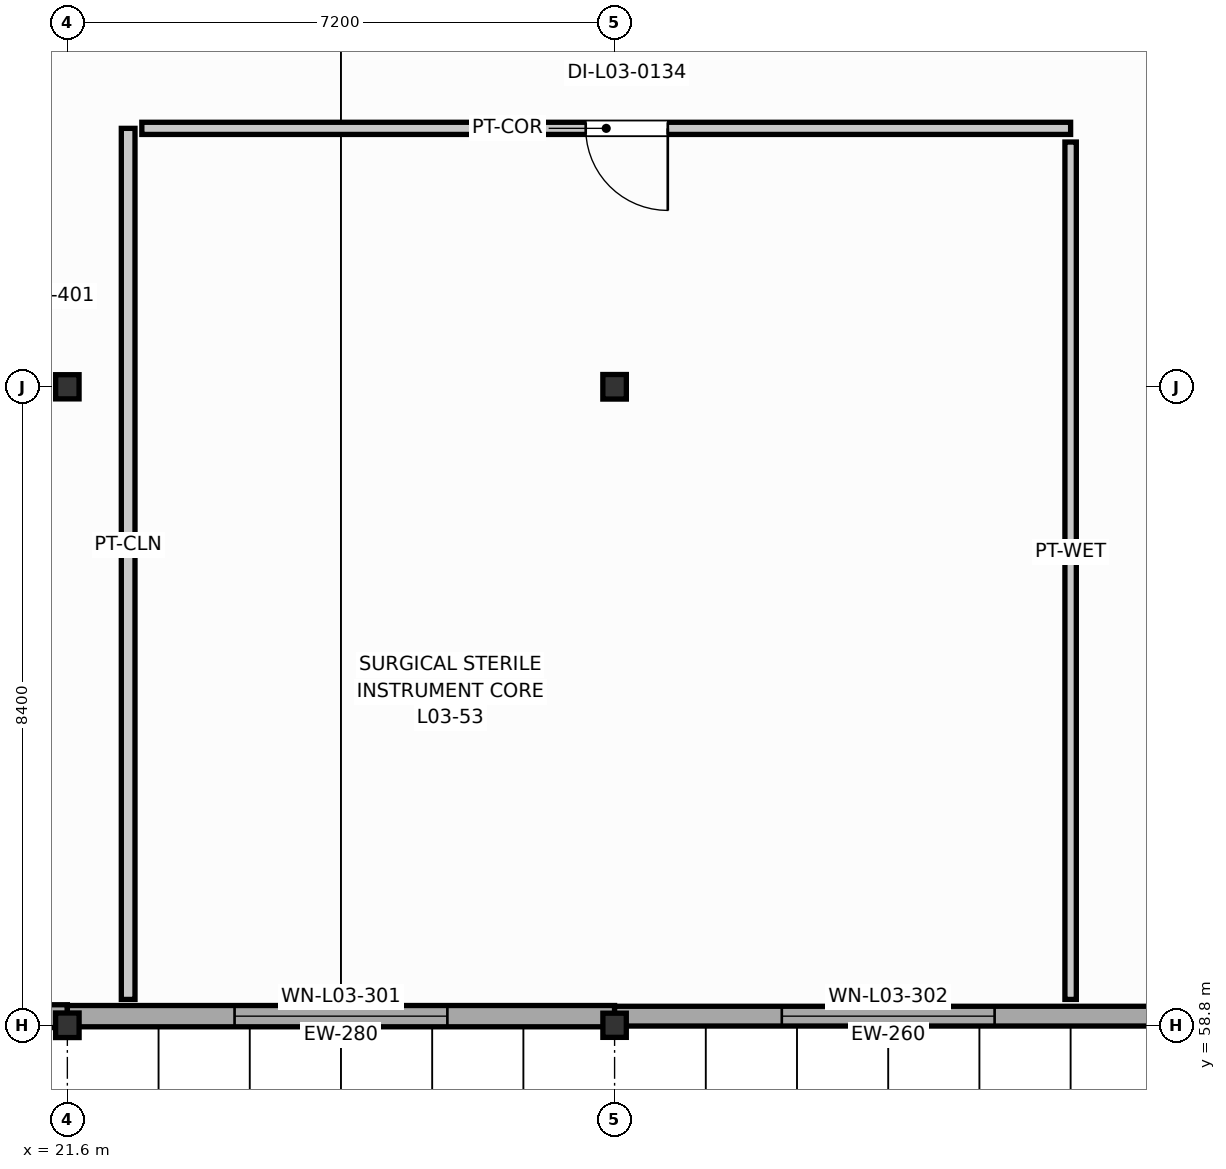
"""IFC4 building model, lengths in metres.
Left out: names, types, materials, properties, quantities, classifications, styles, units other than length and angle.
Written with IfcOpenShell. Run it as: python <this file> out.ifc"""

import sys

from ifc_helpers import new_model, si_unit, direction, frame, frame_2d, origin, origin_2d, place, context, subcontext, project, spatial, rectangle, i_section, extrude, element, fill, save


model = new_model("IFC4")
c1 = context("Model", 3, precision=1e-05, world=origin(), true_north=direction((0.0, 1.0)))
c2 = subcontext(c1, "Body", "Model", "MODEL_VIEW")
j1 = project(units=[si_unit("LENGTHUNIT", "METRE"), si_unit("PLANEANGLEUNIT", "RADIAN")], contexts=[c1])
p1 = place(None, origin())
s1 = spatial("IfcSite", under=j1, at=p1, CompositionType="ELEMENT")
p2 = place(p1, origin())
s2 = spatial("IfcBuilding", under=s1, at=p2, CompositionType="ELEMENT")
p3 = place(p2, frame((0.0, 0.0, 13.2)))
s3 = spatial("IfcBuildingStorey", under=s2, at=p3, CompositionType="ELEMENT", Elevation=13.2)
p4 = place(p3, frame((21.6, 58.8, 0.0), z_axis=(0.0, 0.0, 1.0), x_axis=(1.0, 0.0, 0.0)))
e1 = element("IfcColumn", 1, at=p4, inside=s3, PredefinedType="COLUMN", context=c2, shape_type="SweptSolid", body=[
    extrude(i_section(OverallWidth=0.309, OverallDepth=0.323, WebThickness=0.014, FlangeThickness=0.023, FilletRadius=0.016, at=origin_2d()), origin(), (0.0, 0.0, 1.0), 4.2),
])
for number, where, z_axis, x_axis in (
    (2, (21.6, 67.2, 0.0), (0.0, 0.0, 1.0), (1.0, 0.0, 0.0)),
    (3, (28.8, 58.8, 0.0), (0.0, 0.0, 1.0), (1.0, 0.0, 0.0)),
):
    element("IfcColumn", number, at=place(p3, frame(where, z_axis=z_axis, x_axis=x_axis)), inside=s3, PredefinedType="COLUMN", context=c2, shape_type="SweptSolid", body=[
        extrude(i_section(OverallWidth=0.308, OverallDepth=0.318, WebThickness=0.013, FlangeThickness=0.021, FilletRadius=0.016, at=origin_2d()), origin(), (0.0, 0.0, 1.0), 4.2),
    ])
p5 = place(p3, frame((28.8, 67.2, 0.0), z_axis=(0.0, 0.0, 1.0), x_axis=(1.0, 0.0, 0.0)))
e4 = element("IfcColumn", 4, at=p5, inside=s3, PredefinedType="COLUMN", context=c2, shape_type="SweptSolid", body=[
    extrude(i_section(OverallWidth=0.309, OverallDepth=0.323, WebThickness=0.014, FlangeThickness=0.023, FilletRadius=0.016, at=origin_2d()), origin(), (0.0, 0.0, 1.0), 4.2),
])
p6 = place(p3, frame((14.4, 58.92, 0.0), z_axis=(0.0, 0.0, 1.0), x_axis=(1.0, 0.0, 0.0)))
e5 = element("IfcWall", 5, at=p6, inside=s3, PredefinedType="SOLIDWALL", context=c2, shape_type="SweptSolid", body=[
    extrude(rectangle(XDim=7.2, YDim=0.3, at=frame_2d((3.6, 0.0))), origin(), (0.0, 0.0, 1.0), 3.482),
])
p7 = place(p6, frame((2.3, 0.0, 0.95)))
e6 = element("IfcOpeningElement", 6, at=p7, cuts=e5, PredefinedType="OPENING", context=c2, shape_type="SweptSolid", body=[
    extrude(rectangle(XDim=2.6, YDim=1.75, at=frame_2d((1.3, 0.875))), frame((0.0, 0.16, 0.0), z_axis=(0.0, -1.0, 0.0), x_axis=(1.0, 0.0, 0.0)), (0.0, 0.0, 1.0), 0.32),
])
p8 = place(p3, frame((21.6, 58.92, 0.0), z_axis=(0.0, 0.0, 1.0), x_axis=(1.0, 0.0, 0.0)))
e7 = element("IfcWall", 7, at=p8, inside=s3, PredefinedType="SOLIDWALL", context=c2, shape_type="SweptSolid", body=[
    extrude(rectangle(XDim=7.2, YDim=0.28, at=frame_2d((3.6, 0.0))), origin(), (0.0, 0.0, 1.0), 3.249),
])
p9 = place(p8, frame((2.2, 0.0, 0.95)))
e8 = element("IfcOpeningElement", 8, at=p9, cuts=e7, PredefinedType="OPENING", context=c2, shape_type="SweptSolid", body=[
    extrude(rectangle(XDim=2.8, YDim=1.15, at=frame_2d((1.4, 0.575))), frame((0.0, 0.15, 0.0), z_axis=(0.0, -1.0, 0.0), x_axis=(1.0, 0.0, 0.0)), (0.0, 0.0, 1.0), 0.3),
])
p10 = place(p3, frame((28.8, 58.92, 0.0), z_axis=(0.0, 0.0, 1.0), x_axis=(1.0, 0.0, 0.0)))
e9 = element("IfcWall", 9, at=p10, inside=s3, PredefinedType="SOLIDWALL", context=c2, shape_type="SweptSolid", body=[
    extrude(rectangle(XDim=7.2, YDim=0.26, at=frame_2d((3.6, 0.0))), origin(), (0.0, 0.0, 1.0), 3.249),
])
p11 = place(p10, frame((2.2, 0.0, 0.95)))
e10 = element("IfcOpeningElement", 10, at=p11, cuts=e9, PredefinedType="OPENING", context=c2, shape_type="SweptSolid", body=[
    extrude(rectangle(XDim=2.8, YDim=1.35, at=frame_2d((1.4, 0.675))), frame((0.0, 0.14, 0.0), z_axis=(0.0, -1.0, 0.0), x_axis=(1.0, 0.0, 0.0)), (0.0, 0.0, 1.0), 0.28),
])
p12 = place(p3, frame((22.4, 59.14, 0.0), z_axis=(0.0, 0.0, 1.0), x_axis=(0.0, 1.0, 0.0)))
e11 = element("IfcWall", 11, at=p12, inside=s3, PredefinedType="PARTITIONING", context=c2, shape_type="SweptSolid", body=[
    extrude(rectangle(XDim=11.46, YDim=0.18, at=frame_2d((5.73, 0.0))), origin(), (0.0, 0.0, 1.0), 3.485),
])
p13 = place(p3, frame((22.58, 70.6, 0.0), z_axis=(0.0, 0.0, 1.0), x_axis=(1.0, 0.0, 0.0)))
e12 = element("IfcWall", 12, at=p13, inside=s3, PredefinedType="PARTITIONING", context=c2, shape_type="SweptSolid", body=[
    extrude(rectangle(XDim=12.22, YDim=0.16, at=frame_2d((6.11, 0.0))), origin(), (0.0, 0.0, 1.0), 3.945),
])
p14 = place(p13, frame((5.84, 0.0, 0.0)))
e13 = element("IfcOpeningElement", 13, at=p14, cuts=e12, PredefinedType="OPENING", context=c2, shape_type="SweptSolid", body=[
    extrude(rectangle(XDim=1.08, YDim=2.15, at=frame_2d((0.54, 1.075))), frame((0.0, 0.09, 0.0), z_axis=(0.0, -1.0, 0.0), x_axis=(1.0, 0.0, 0.0)), (0.0, 0.0, 1.0), 0.18),
])
p15 = place(p3, frame((34.8, 70.42, 0.0), z_axis=(0.0, 0.0, 1.0), x_axis=(0.0, -1.0, 0.0)))
e14 = element("IfcWall", 14, at=p15, inside=s3, PredefinedType="PLUMBINGWALL", context=c2, shape_type="SweptSolid", body=[
    extrude(rectangle(XDim=11.28, YDim=0.15, at=frame_2d((5.64, 0.0))), origin(), (0.0, 0.0, 1.0), 3.532),
])
p16 = place(p9, origin())
e15 = element("IfcWindow", 15, at=p16, inside=s3, PartitioningType="SINGLE_PANEL", PredefinedType="WINDOW", context=c2, shape_type="SweptSolid", body=[
    extrude(rectangle(XDim=2.8, YDim=1.15, at=frame_2d((1.4, 0.575))), frame((0.0, 0.03, 0.0), z_axis=(0.0, -1.0, 0.0), x_axis=(1.0, 0.0, 0.0)), (0.0, 0.0, 1.0), 0.06),
])
fill(e8, e15)
p17 = place(p11, origin())
e16 = element("IfcWindow", 16, at=p17, inside=s3, PartitioningType="SINGLE_PANEL", PredefinedType="WINDOW", context=c2, shape_type="SweptSolid", body=[
    extrude(rectangle(XDim=2.8, YDim=1.35, at=frame_2d((1.4, 0.675))), frame((0.0, 0.03, 0.0), z_axis=(0.0, -1.0, 0.0), x_axis=(1.0, 0.0, 0.0)), (0.0, 0.0, 1.0), 0.06),
])
fill(e10, e16)
p18 = place(p14, frame((1.08, 0.0, 0.0), z_axis=(0.0, 0.0, 1.0), x_axis=(-1.0, 0.0, 0.0)))
e17 = element("IfcDoor", 17, at=p18, inside=s3, OperationType="SINGLE_SWING_LEFT", PredefinedType="DOOR", context=c2, shape_type="SweptSolid", body=[
    extrude(rectangle(XDim=1.08, YDim=2.15, at=frame_2d((0.54, 1.075))), frame((0.0, 0.025, 0.0), z_axis=(0.0, -1.0, 0.0), x_axis=(1.0, 0.0, 0.0)), (0.0, 0.0, 1.0), 0.05),
])
fill(e13, e17)
save(model, sys.argv[1])
